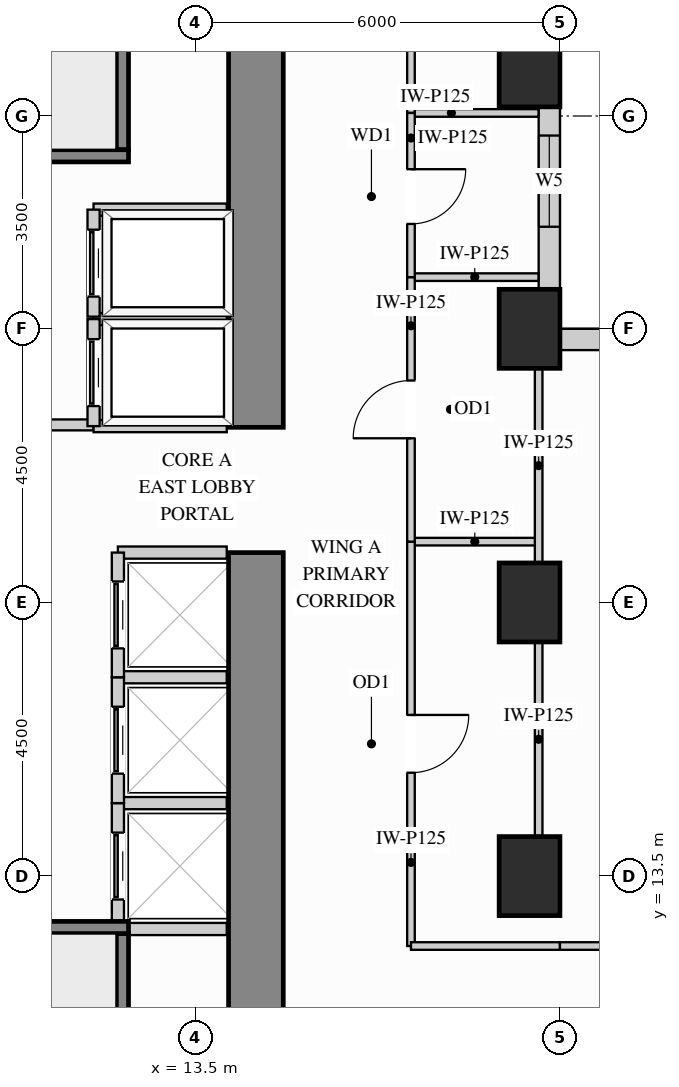
"""IFC4 building model, lengths in metres.
Left out: names, types, materials, properties, quantities, classifications, styles, units other than length and angle.
Written with IfcOpenShell. Run it as: python <this file> out.ifc"""

import sys

from ifc_helpers import new_model, si_unit, direction, frame, frame_2d, origin, origin_2d, place, context, subcontext, project, spatial, rectangle, extrude, source, transform, mapped, element, fill, save


model = new_model("IFC4")
c1 = context("Model", 3, precision=1e-05, world=origin(), true_north=direction((0.0, 1.0)))
c2 = subcontext(c1, "Body", "Model", "MODEL_VIEW")
j1 = project(units=[si_unit("LENGTHUNIT", "METRE"), si_unit("PLANEANGLEUNIT", "RADIAN")], contexts=[c1])
p1 = place(None, origin())
s1 = spatial("IfcSite", under=j1, at=p1, CompositionType="ELEMENT")
p2 = place(p1, origin())
s2 = spatial("IfcBuilding", under=s1, at=p2, CompositionType="ELEMENT")
p3 = place(p2, frame((0.0, 0.0, 54.9)))
s3 = spatial("IfcBuildingStorey", under=s2, at=p3, CompositionType="ELEMENT", Elevation=54.9)
m1 = source(origin(), c2, "Body", "SweptSolid", [
    extrude(rectangle(XDim=1.0, YDim=1.3, at=origin_2d()), origin(), (0.0, 0.0, 1.0), 3.38),
])
for number, where, z_axis, x_axis in (
    (1, (19.0, 13.5, 0.0), (0.0, 0.0, 1.0), (1.0, 0.0, 0.0)),
    (2, (19.0, 18.0, 0.0), (0.0, 0.0, 1.0), (1.0, 0.0, 0.0)),
    (3, (19.0, 22.5, 0.0), (0.0, 0.0, 1.0), (1.0, 0.0, 0.0)),
    (4, (19.0, 26.8, 0.0), (0.0, 0.0, 1.0), (1.0, 0.0, 0.0)),
):
    element("IfcColumn", number, at=place(p3, frame(where, z_axis=z_axis, x_axis=x_axis)), inside=s3, PredefinedType="COLUMN", context=c2, shape_type="MappedRepresentation", body=[
        mapped(m1, transform((0.0, 0.0, 0.0), x_axis=(1.0, 0.0, 0.0), y_axis=(0.0, 1.0, 0.0), z_axis=(0.0, 0.0, 1.0))),
    ])
m2 = source(origin(), c2, "Body", "SweptSolid", [
    extrude(rectangle(XDim=9.87, YDim=0.9, at=frame_2d((4.935, 0.0))), origin(), (0.0, 0.0, 1.0), 3.38),
])
p4 = place(p3, frame((14.5, 8.95, 0.0), z_axis=(0.0, 0.0, 1.0), x_axis=(0.0, 1.0, 0.0)))
e5 = element("IfcWall", 5, at=p4, inside=s3, PredefinedType="SHEAR", context=c2, shape_type="MappedRepresentation", body=[
    mapped(m2, transform((0.0, 0.0, 0.0), x_axis=(1.0, 0.0, 0.0), y_axis=(0.0, 1.0, 0.0), z_axis=(0.0, 0.0, 1.0))),
])
m3 = source(origin(), c2, "Body", "SweptSolid", [
    extrude(rectangle(XDim=8.17, YDim=0.9, at=frame_2d((4.085, 0.0))), origin(), (0.0, 0.0, 1.0), 3.38),
])
p5 = place(p3, frame((14.5, 20.88, 0.0), z_axis=(0.0, 0.0, 1.0), x_axis=(0.0, 1.0, 0.0)))
e6 = element("IfcWall", 6, at=p5, inside=s3, PredefinedType="SHEAR", context=c2, shape_type="MappedRepresentation", body=[
    mapped(m3, transform((0.0, 0.0, 0.0), x_axis=(1.0, 0.0, 0.0), y_axis=(0.0, 1.0, 0.0), z_axis=(0.0, 0.0, 1.0))),
])
p6 = place(p3, frame((34.352, 22.325, 0.0), z_axis=(0.0, 0.0, 1.0), x_axis=(-1.0, 0.0, 0.0)))
e7 = element("IfcWall", 7, at=p6, inside=s3, PredefinedType="SOLIDWALL", context=c2, shape_type="SweptSolid", body=[
    extrude(rectangle(XDim=14.854, YDim=0.35, at=frame_2d((7.427, 0.0))), origin(), (0.0, 0.0, 1.0), 3.365),
])
p7 = place(p6, frame((4.058, 0.0, 0.78)))
e8 = element("IfcOpeningElement", 8, at=p7, cuts=e7, PredefinedType="OPENING", context=c2, shape_type="SweptSolid", body=[
    extrude(rectangle(XDim=1.5, YDim=2.0, at=frame_2d((0.75, 1.0))), frame((0.0, 0.185, 0.0), z_axis=(0.0, -1.0, 0.0), x_axis=(1.0, 0.0, 0.0)), (0.0, 0.0, 1.0), 0.37),
])
p8 = place(p6, frame((9.296, 0.0, 0.78)))
e9 = element("IfcOpeningElement", 9, at=p8, cuts=e7, PredefinedType="OPENING", context=c2, shape_type="SweptSolid", body=[
    extrude(rectangle(XDim=1.5, YDim=2.0, at=frame_2d((0.75, 1.0))), frame((0.0, 0.185, 0.0), z_axis=(0.0, -1.0, 0.0), x_axis=(1.0, 0.0, 0.0)), (0.0, 0.0, 1.0), 0.37),
])
p9 = place(p3, frame((19.325, 23.148, 0.0), z_axis=(0.0, 0.0, 1.0), x_axis=(0.0, 1.0, 0.0)))
e10 = element("IfcWall", 10, at=p9, inside=s3, PredefinedType="SOLIDWALL", context=c2, shape_type="SweptSolid", body=[
    extrude(rectangle(XDim=3.004, YDim=0.35, at=frame_2d((1.502, 0.0))), origin(), (0.0, 0.0, 1.0), 2.51),
])
p10 = place(p9, frame((1.031, 0.0, 0.78)))
e11 = element("IfcOpeningElement", 11, at=p10, cuts=e10, PredefinedType="OPENING", context=c2, shape_type="SweptSolid", body=[
    extrude(rectangle(XDim=1.5, YDim=1.55, at=frame_2d((0.75, 0.775))), frame((0.0, 0.185, 0.0), z_axis=(0.0, -1.0, 0.0), x_axis=(1.0, 0.0, 0.0)), (0.0, 0.0, 1.0), 0.37),
])
p11 = place(p3, frame((7.15, 20.92, 0.0), z_axis=(0.0, 0.0, 1.0), x_axis=(1.0, 0.0, 0.0)))
e12 = element("IfcWall", 12, at=p11, inside=s3, PredefinedType="PARTITIONING", context=c2, shape_type="SweptSolid", body=[
    extrude(rectangle(XDim=4.68, YDim=0.18, at=frame_2d((2.34, 0.0))), origin(), (0.0, 0.0, 1.0), 3.365),
])
p12 = place(p11, frame((2.2, 0.0, 0.0)))
e13 = element("IfcOpeningElement", 13, at=p12, cuts=e12, PredefinedType="OPENING", context=c2, shape_type="SweptSolid", body=[
    extrude(rectangle(XDim=1.1, YDim=2.15, at=frame_2d((0.55, 1.075))), frame((0.0, 0.1, 0.0), z_axis=(0.0, -1.0, 0.0), x_axis=(1.0, 0.0, 0.0)), (0.0, 0.0, 1.0), 0.2),
])
m4 = source(origin(), c2, "Body", "SweptSolid", [
    extrude(rectangle(XDim=2.1, YDim=0.125, at=frame_2d((1.05, 0.0))), origin(), (0.0, 0.0, 1.0), 3.365),
])
p13 = place(p3, frame((17.05, 19.0, 0.0), z_axis=(0.0, 0.0, 1.0), x_axis=(1.0, 0.0, 0.0)))
e14 = element("IfcWall", 14, at=p13, inside=s3, PredefinedType="PARTITIONING", context=c2, shape_type="MappedRepresentation", body=[
    mapped(m4, transform((0.0, 0.0, 0.0), x_axis=(1.0, 0.0, 0.0), y_axis=(0.0, 1.0, 0.0), z_axis=(0.0, 0.0, 1.0))),
])
m5 = source(origin(), c2, "Body", "SweptSolid", [
    extrude(rectangle(XDim=2.098, YDim=0.125, at=frame_2d((1.049, 0.0))), origin(), (0.0, 0.0, 1.0), 3.365),
])
for number, where, z_axis, x_axis in (
    (15, (17.05, 23.35, 0.0), (0.0, 0.0, 1.0), (1.0, 0.0, 0.0)),
    (16, (17.05, 26.05, 0.0), (0.0, 0.0, 1.0), (1.0, 0.0, 0.0)),
):
    element("IfcWall", number, at=place(p3, frame(where, z_axis=z_axis, x_axis=x_axis)), inside=s3, PredefinedType="PARTITIONING", context=c2, shape_type="MappedRepresentation", body=[
        mapped(m5, transform((0.0, 0.0, 0.0), x_axis=(1.0, 0.0, 0.0), y_axis=(0.0, 1.0, 0.0), z_axis=(0.0, 0.0, 1.0))),
    ])
m6 = source(origin(), c2, "Body", "SweptSolid", [
    extrude(rectangle(XDim=3.18, YDim=0.125, at=frame_2d((1.59, 0.0))), origin(), (0.0, 0.0, 1.0), 2.67),
])
for number, where, z_axis, x_axis in (
    (17, (19.15, 14.16, 0.0), (0.0, 0.0, 1.0), (0.0, 1.0, 0.0)),
    (18, (19.15, 18.66, 0.0), (0.0, 0.0, 1.0), (0.0, 1.0, 0.0)),
):
    element("IfcWall", number, at=place(p3, frame(where, z_axis=z_axis, x_axis=x_axis)), inside=s3, PredefinedType="PARTITIONING", context=c2, shape_type="MappedRepresentation", body=[
        mapped(m6, transform((0.0, 0.0, 0.0), x_axis=(1.0, 0.0, 0.0), y_axis=(0.0, 1.0, 0.0), z_axis=(0.0, 0.0, 1.0))),
    ])
p14 = place(p3, frame((17.05, 12.35, 0.0), z_axis=(0.0, 0.0, 1.0), x_axis=(0.0, 1.0, 0.0)))
e19 = element("IfcWall", 19, at=p14, inside=s3, PredefinedType="PARTITIONING", context=c2, shape_type="SweptSolid", body=[
    extrude(rectangle(XDim=6.65, YDim=0.125, at=frame_2d((3.325, 0.0))), origin(), (0.0, 0.0, 1.0), 3.365),
])
p15 = place(p14, frame((2.85, 0.0, 0.0)))
e20 = element("IfcOpeningElement", 20, at=p15, cuts=e19, PredefinedType="OPENING", context=c2, shape_type="SweptSolid", body=[
    extrude(rectangle(XDim=0.95, YDim=2.15, at=frame_2d((0.475, 1.075))), frame((0.0, 0.073, 0.0), z_axis=(0.0, -1.0, 0.0), x_axis=(1.0, 0.0, 0.0)), (0.0, 0.0, 1.0), 0.145),
])
p16 = place(p3, frame((17.05, 19.0, 0.0), z_axis=(0.0, 0.0, 1.0), x_axis=(0.0, 1.0, 0.0)))
e21 = element("IfcWall", 21, at=p16, inside=s3, PredefinedType="PARTITIONING", context=c2, shape_type="SweptSolid", body=[
    extrude(rectangle(XDim=4.35, YDim=0.125, at=frame_2d((2.175, 0.0))), origin(), (0.0, 0.0, 1.0), 3.365),
])
p17 = place(p16, frame((1.7, 0.0, 0.0)))
e22 = element("IfcOpeningElement", 22, at=p17, cuts=e21, PredefinedType="OPENING", context=c2, shape_type="SweptSolid", body=[
    extrude(rectangle(XDim=0.95, YDim=2.15, at=frame_2d((0.475, 1.075))), frame((0.0, 0.073, 0.0), z_axis=(0.0, -1.0, 0.0), x_axis=(1.0, 0.0, 0.0)), (0.0, 0.0, 1.0), 0.145),
])
p18 = place(p3, frame((17.05, 26.05, 0.0), z_axis=(0.0, 0.0, 1.0), x_axis=(0.0, 1.0, 0.0)))
e23 = element("IfcWall", 23, at=p18, inside=s3, PredefinedType="PARTITIONING", context=c2, shape_type="SweptSolid", body=[
    extrude(rectangle(XDim=7.2, YDim=0.125, at=frame_2d((3.6, 0.0))), origin(), (0.0, 0.0, 1.0), 3.365),
])
p19 = place(p18, frame((3.125, 0.0, 0.0)))
e24 = element("IfcOpeningElement", 24, at=p19, cuts=e23, PredefinedType="OPENING", context=c2, shape_type="SweptSolid", body=[
    extrude(rectangle(XDim=0.95, YDim=2.15, at=frame_2d((0.475, 1.075))), frame((0.0, 0.073, 0.0), z_axis=(0.0, -1.0, 0.0), x_axis=(1.0, 0.0, 0.0)), (0.0, 0.0, 1.0), 0.145),
])
p20 = place(p3, frame((17.05, 23.35, 0.0), z_axis=(0.0, 0.0, 1.0), x_axis=(0.0, 1.0, 0.0)))
e25 = element("IfcWall", 25, at=p20, inside=s3, PredefinedType="PARTITIONING", context=c2, shape_type="SweptSolid", body=[
    extrude(rectangle(XDim=2.7, YDim=0.125, at=frame_2d((1.35, 0.0))), origin(), (0.0, 0.0, 1.0), 3.365),
])
p21 = place(p20, frame((0.875, 0.0, 0.0)))
e26 = element("IfcOpeningElement", 26, at=p21, cuts=e25, PredefinedType="OPENING", context=c2, shape_type="SweptSolid", body=[
    extrude(rectangle(XDim=0.9, YDim=2.15, at=frame_2d((0.45, 1.075))), frame((0.0, 0.073, 0.0), z_axis=(0.0, -1.0, 0.0), x_axis=(1.0, 0.0, 0.0)), (0.0, 0.0, 1.0), 0.145),
])
m7 = source(origin(), c2, "Body", "SweptSolid", [
    extrude(rectangle(XDim=2.45, YDim=0.125, at=frame_2d((1.225, 0.0))), origin(), (0.0, 0.0, 1.0), 3.365),
])
p22 = place(p3, frame((17.05, 12.35, 0.0), z_axis=(0.0, 0.0, 1.0), x_axis=(1.0, 0.0, 0.0)))
e27 = element("IfcWall", 27, at=p22, inside=s3, PredefinedType="PARTITIONING", context=c2, shape_type="MappedRepresentation", body=[
    mapped(m7, transform((0.0, 0.0, 0.0), x_axis=(1.0, 0.0, 0.0), y_axis=(0.0, 1.0, 0.0), z_axis=(0.0, 0.0, 1.0))),
])
p23 = place(p3, frame((19.5, 12.35, 0.0), z_axis=(0.0, 0.0, 1.0), x_axis=(1.0, 0.0, 0.0)))
e28 = element("IfcWall", 28, at=p23, inside=s3, PredefinedType="PARTITIONING", context=c2, shape_type="SweptSolid", body=[
    extrude(rectangle(XDim=4.55, YDim=0.125, at=frame_2d((2.275, 0.0))), origin(), (0.0, 0.0, 1.0), 3.365),
])
p24 = place(p23, frame((1.8, 0.0, 0.0)))
e29 = element("IfcOpeningElement", 29, at=p24, cuts=e28, PredefinedType="OPENING", context=c2, shape_type="SweptSolid", body=[
    extrude(rectangle(XDim=0.95, YDim=2.15, at=frame_2d((0.475, 1.075))), frame((0.0, 0.073, 0.0), z_axis=(0.0, -1.0, 0.0), x_axis=(1.0, 0.0, 0.0)), (0.0, 0.0, 1.0), 0.145),
])
m8 = source(origin(), c2, "Body", "SweptSolid", [
    extrude(rectangle(XDim=2.19, YDim=0.2, at=frame_2d((1.095, 0.0))), origin(), (0.0, 0.0, 1.0), 3.365),
])
for number, where, z_axis, x_axis in (
    (30, (11.83, 22.66, 0.0), (0.0, 0.0, 1.0), (1.0, 0.0, 0.0)),
    (31, (11.83, 20.9, 0.0), (0.0, 0.0, 1.0), (1.0, 0.0, 0.0)),
):
    element("IfcWall", number, at=place(p3, frame(where, z_axis=z_axis, x_axis=x_axis)), inside=s3, PredefinedType="PARTITIONING", context=c2, shape_type="MappedRepresentation", body=[
        mapped(m8, transform((0.0, 0.0, 0.0), x_axis=(1.0, 0.0, 0.0), y_axis=(0.0, 1.0, 0.0), z_axis=(0.0, 0.0, 1.0))),
    ])
p25 = place(p3, frame((11.83, 20.9, 0.0), z_axis=(0.0, 0.0, 1.0), x_axis=(0.0, 1.0, 0.0)))
e32 = element("IfcWall", 32, at=p25, inside=s3, PredefinedType="PARTITIONING", context=c2, shape_type="SweptSolid", body=[
    extrude(rectangle(XDim=1.76, YDim=0.2, at=frame_2d((0.88, 0.0))), origin(), (0.0, 0.0, 1.0), 3.365),
])
p26 = place(p25, frame((0.33, 0.0, 0.0)))
e33 = element("IfcOpeningElement", 33, at=p26, cuts=e32, PredefinedType="OPENING", context=c2, shape_type="SweptSolid", body=[
    extrude(rectangle(XDim=1.1, YDim=2.2, at=frame_2d((0.55, 1.1))), frame((0.0, 0.11, 0.0), z_axis=(0.0, -1.0, 0.0), x_axis=(1.0, 0.0, 0.0)), (0.0, 0.0, 1.0), 0.22),
])
p27 = place(p3, frame((11.83, 24.46, 0.0), z_axis=(0.0, 0.0, 1.0), x_axis=(1.0, 0.0, 0.0)))
e34 = element("IfcWall", 34, at=p27, inside=s3, PredefinedType="PARTITIONING", context=c2, shape_type="MappedRepresentation", body=[
    mapped(m8, transform((0.0, 0.0, 0.0), x_axis=(1.0, 0.0, 0.0), y_axis=(0.0, 1.0, 0.0), z_axis=(0.0, 0.0, 1.0))),
])
p28 = place(p3, frame((11.83, 22.7, 0.0), z_axis=(0.0, 0.0, 1.0), x_axis=(0.0, 1.0, 0.0)))
e35 = element("IfcWall", 35, at=p28, inside=s3, PredefinedType="PARTITIONING", context=c2, shape_type="SweptSolid", body=[
    extrude(rectangle(XDim=1.76, YDim=0.2, at=frame_2d((0.88, 0.0))), origin(), (0.0, 0.0, 1.0), 3.365),
])
p29 = place(p28, frame((0.33, 0.0, 0.0)))
e36 = element("IfcOpeningElement", 36, at=p29, cuts=e35, PredefinedType="OPENING", context=c2, shape_type="SweptSolid", body=[
    extrude(rectangle(XDim=1.1, YDim=2.2, at=frame_2d((0.55, 1.1))), frame((0.0, 0.11, 0.0), z_axis=(0.0, -1.0, 0.0), x_axis=(1.0, 0.0, 0.0)), (0.0, 0.0, 1.0), 0.22),
])
m9 = source(origin(), c2, "Body", "SweptSolid", [
    extrude(rectangle(XDim=1.79, YDim=0.2, at=frame_2d((0.895, 0.0))), origin(), (0.0, 0.0, 1.0), 3.365),
])
for number, where, z_axis, x_axis in (
    (37, (12.23, 14.7, 0.0), (0.0, 0.0, 1.0), (1.0, 0.0, 0.0)),
    (38, (12.23, 12.63, 0.0), (0.0, 0.0, 1.0), (1.0, 0.0, 0.0)),
):
    element("IfcWall", number, at=place(p3, frame(where, z_axis=z_axis, x_axis=x_axis)), inside=s3, PredefinedType="PARTITIONING", context=c2, shape_type="MappedRepresentation", body=[
        mapped(m9, transform((0.0, 0.0, 0.0), x_axis=(1.0, 0.0, 0.0), y_axis=(0.0, 1.0, 0.0), z_axis=(0.0, 0.0, 1.0))),
    ])
p30 = place(p3, frame((12.23, 12.63, 0.0), z_axis=(0.0, 0.0, 1.0), x_axis=(0.0, 1.0, 0.0)))
e39 = element("IfcWall", 39, at=p30, inside=s3, PredefinedType="PARTITIONING", context=c2, shape_type="SweptSolid", body=[
    extrude(rectangle(XDim=2.07, YDim=0.2, at=frame_2d((1.035, 0.0))), origin(), (0.0, 0.0, 1.0), 3.365),
])
p31 = place(p30, frame((0.485, 0.0, 0.0)))
e40 = element("IfcOpeningElement", 40, at=p31, cuts=e39, PredefinedType="OPENING", context=c2, shape_type="SweptSolid", body=[
    extrude(rectangle(XDim=1.1, YDim=2.2, at=frame_2d((0.55, 1.1))), frame((0.0, 0.11, 0.0), z_axis=(0.0, -1.0, 0.0), x_axis=(1.0, 0.0, 0.0)), (0.0, 0.0, 1.0), 0.22),
])
p32 = place(p3, frame((12.23, 16.77, 0.0), z_axis=(0.0, 0.0, 1.0), x_axis=(1.0, 0.0, 0.0)))
e41 = element("IfcWall", 41, at=p32, inside=s3, PredefinedType="PARTITIONING", context=c2, shape_type="MappedRepresentation", body=[
    mapped(m9, transform((0.0, 0.0, 0.0), x_axis=(1.0, 0.0, 0.0), y_axis=(0.0, 1.0, 0.0), z_axis=(0.0, 0.0, 1.0))),
])
p33 = place(p3, frame((12.23, 14.7, 0.0), z_axis=(0.0, 0.0, 1.0), x_axis=(0.0, 1.0, 0.0)))
e42 = element("IfcWall", 42, at=p33, inside=s3, PredefinedType="PARTITIONING", context=c2, shape_type="SweptSolid", body=[
    extrude(rectangle(XDim=2.07, YDim=0.2, at=frame_2d((1.035, 0.0))), origin(), (0.0, 0.0, 1.0), 3.365),
])
p34 = place(p33, frame((0.485, 0.0, 0.0)))
e43 = element("IfcOpeningElement", 43, at=p34, cuts=e42, PredefinedType="OPENING", context=c2, shape_type="SweptSolid", body=[
    extrude(rectangle(XDim=1.1, YDim=2.2, at=frame_2d((0.55, 1.1))), frame((0.0, 0.11, 0.0), z_axis=(0.0, -1.0, 0.0), x_axis=(1.0, 0.0, 0.0)), (0.0, 0.0, 1.0), 0.22),
])
p35 = place(p3, frame((12.23, 18.82, 0.0), z_axis=(0.0, 0.0, 1.0), x_axis=(1.0, 0.0, 0.0)))
e44 = element("IfcWall", 44, at=p35, inside=s3, PredefinedType="PARTITIONING", context=c2, shape_type="MappedRepresentation", body=[
    mapped(m9, transform((0.0, 0.0, 0.0), x_axis=(1.0, 0.0, 0.0), y_axis=(0.0, 1.0, 0.0), z_axis=(0.0, 0.0, 1.0))),
])
p36 = place(p3, frame((12.23, 16.77, 0.0), z_axis=(0.0, 0.0, 1.0), x_axis=(0.0, 1.0, 0.0)))
e45 = element("IfcWall", 45, at=p36, inside=s3, PredefinedType="PARTITIONING", context=c2, shape_type="SweptSolid", body=[
    extrude(rectangle(XDim=2.05, YDim=0.2, at=frame_2d((1.025, 0.0))), origin(), (0.0, 0.0, 1.0), 3.365),
])
p37 = place(p36, frame((0.475, 0.0, 0.0)))
e46 = element("IfcOpeningElement", 46, at=p37, cuts=e45, PredefinedType="OPENING", context=c2, shape_type="SweptSolid", body=[
    extrude(rectangle(XDim=1.1, YDim=2.2, at=frame_2d((0.55, 1.1))), frame((0.0, 0.11, 0.0), z_axis=(0.0, -1.0, 0.0), x_axis=(1.0, 0.0, 0.0)), (0.0, 0.0, 1.0), 0.22),
])
m10 = source(origin(), c2, "Body", "SweptSolid", [
    extrude(rectangle(XDim=3.603, YDim=0.2, at=frame_2d((1.802, 0.0))), origin(), (0.0, 0.0, 1.0), 3.38),
])
p38 = place(p3, frame((12.305, 8.952, 0.0), z_axis=(0.0, 0.0, 1.0), x_axis=(0.0, 1.0, 0.0)))
e47 = element("IfcWall", 47, at=p38, inside=s3, PredefinedType="SHEAR", context=c2, shape_type="MappedRepresentation", body=[
    mapped(m10, transform((0.0, 0.0, 0.0), x_axis=(1.0, 0.0, 0.0), y_axis=(0.0, 1.0, 0.0), z_axis=(0.0, 0.0, 1.0))),
])
p39 = place(p3, frame((4.952, 12.655, 0.0), z_axis=(0.0, 0.0, 1.0), x_axis=(1.0, 0.0, 0.0)))
e48 = element("IfcWall", 48, at=p39, inside=s3, PredefinedType="SHEAR", context=c2, shape_type="SweptSolid", body=[
    extrude(rectangle(XDim=7.453, YDim=0.2, at=frame_2d((3.727, 0.0))), origin(), (0.0, 0.0, 1.0), 3.38),
])
p40 = place(p39, frame((0.4, 0.0, 0.0)))
e49 = element("IfcOpeningElement", 49, at=p40, cuts=e48, PredefinedType="OPENING", context=c2, shape_type="SweptSolid", body=[
    extrude(rectangle(XDim=1.1, YDim=2.15, at=frame_2d((0.55, 1.075))), frame((0.0, 0.11, 0.0), z_axis=(0.0, -1.0, 0.0), x_axis=(1.0, 0.0, 0.0)), (0.0, 0.0, 1.0), 0.22),
])
p41 = place(p3, frame((12.305, 25.445, 0.0), z_axis=(0.0, 0.0, 1.0), x_axis=(0.0, 1.0, 0.0)))
e50 = element("IfcWall", 50, at=p41, inside=s3, PredefinedType="SHEAR", context=c2, shape_type="MappedRepresentation", body=[
    mapped(m10, transform((0.0, 0.0, 0.0), x_axis=(1.0, 0.0, 0.0), y_axis=(0.0, 1.0, 0.0), z_axis=(0.0, 0.0, 1.0))),
])
p42 = place(p3, frame((4.952, 25.345, 0.0), z_axis=(0.0, 0.0, 1.0), x_axis=(1.0, 0.0, 0.0)))
e51 = element("IfcWall", 51, at=p42, inside=s3, PredefinedType="SHEAR", context=c2, shape_type="SweptSolid", body=[
    extrude(rectangle(XDim=7.453, YDim=0.2, at=frame_2d((3.727, 0.0))), origin(), (0.0, 0.0, 1.0), 3.38),
])
p43 = place(p42, frame((0.4, 0.0, 0.0)))
e52 = element("IfcOpeningElement", 52, at=p43, cuts=e51, PredefinedType="OPENING", context=c2, shape_type="SweptSolid", body=[
    extrude(rectangle(XDim=1.1, YDim=2.15, at=frame_2d((0.55, 1.075))), frame((0.0, 0.11, 0.0), z_axis=(0.0, -1.0, 0.0), x_axis=(1.0, 0.0, 0.0)), (0.0, 0.0, 1.0), 0.22),
])
m11 = source(origin(), c2, "Body", "SweptSolid", [
    extrude(rectangle(XDim=1.1, YDim=2.2, at=frame_2d((0.55, 1.1))), frame((0.0, 0.025, 0.0), z_axis=(0.0, -1.0, 0.0), x_axis=(1.0, 0.0, 0.0)), (0.0, 0.0, 1.0), 0.05),
])
p44 = place(p26, origin())
e53 = element("IfcDoor", 53, at=p44, inside=s3, OperationType="SLIDING_TO_LEFT", PredefinedType="DOOR", context=c2, shape_type="MappedRepresentation", body=[
    mapped(m11, transform((0.0, 0.0, 0.0), x_axis=(1.0, 0.0, 0.0), y_axis=(0.0, 1.0, 0.0), z_axis=(0.0, 0.0, 1.0))),
])
fill(e33, e53)
p45 = place(p29, origin())
e54 = element("IfcDoor", 54, at=p45, inside=s3, OperationType="SLIDING_TO_LEFT", PredefinedType="DOOR", context=c2, shape_type="MappedRepresentation", body=[
    mapped(m11, transform((0.0, 0.0, 0.0), x_axis=(1.0, 0.0, 0.0), y_axis=(0.0, 1.0, 0.0), z_axis=(0.0, 0.0, 1.0))),
])
fill(e36, e54)
p46 = place(p31, origin())
e55 = element("IfcDoor", 55, at=p46, inside=s3, OperationType="SLIDING_TO_LEFT", PredefinedType="DOOR", context=c2, shape_type="MappedRepresentation", body=[
    mapped(m11, transform((0.0, 0.0, 0.0), x_axis=(1.0, 0.0, 0.0), y_axis=(0.0, 1.0, 0.0), z_axis=(0.0, 0.0, 1.0))),
])
fill(e40, e55)
p47 = place(p34, origin())
e56 = element("IfcDoor", 56, at=p47, inside=s3, OperationType="SLIDING_TO_LEFT", PredefinedType="DOOR", context=c2, shape_type="MappedRepresentation", body=[
    mapped(m11, transform((0.0, 0.0, 0.0), x_axis=(1.0, 0.0, 0.0), y_axis=(0.0, 1.0, 0.0), z_axis=(0.0, 0.0, 1.0))),
])
fill(e43, e56)
p48 = place(p37, origin())
e57 = element("IfcDoor", 57, at=p48, inside=s3, OperationType="SLIDING_TO_LEFT", PredefinedType="DOOR", context=c2, shape_type="MappedRepresentation", body=[
    mapped(m11, transform((0.0, 0.0, 0.0), x_axis=(1.0, 0.0, 0.0), y_axis=(0.0, 1.0, 0.0), z_axis=(0.0, 0.0, 1.0))),
])
fill(e46, e57)
m12 = source(origin(), c2, "Body", "SweptSolid", [
    extrude(rectangle(XDim=0.95, YDim=2.15, at=frame_2d((0.475, 1.075))), frame((0.0, 0.025, 0.0), z_axis=(0.0, -1.0, 0.0), x_axis=(1.0, 0.0, 0.0)), (0.0, 0.0, 1.0), 0.05),
])
p49 = place(p15, origin())
e58 = element("IfcDoor", 58, at=p49, inside=s3, OperationType="SINGLE_SWING_RIGHT", PredefinedType="DOOR", context=c2, shape_type="MappedRepresentation", body=[
    mapped(m12, transform((0.0, 0.0, 0.0), x_axis=(1.0, 0.0, 0.0), y_axis=(0.0, 1.0, 0.0), z_axis=(0.0, 0.0, 1.0))),
])
fill(e20, e58)
p50 = place(p17, origin())
e59 = element("IfcDoor", 59, at=p50, inside=s3, OperationType="SINGLE_SWING_LEFT", PredefinedType="DOOR", context=c2, shape_type="MappedRepresentation", body=[
    mapped(m12, transform((0.0, 0.0, 0.0), x_axis=(1.0, 0.0, 0.0), y_axis=(0.0, 1.0, 0.0), z_axis=(0.0, 0.0, 1.0))),
])
fill(e22, e59)
m13 = source(origin(), c2, "Body", "SweptSolid", [
    extrude(rectangle(XDim=0.9, YDim=2.15, at=frame_2d((0.45, 1.075))), frame((0.0, 0.025, 0.0), z_axis=(0.0, -1.0, 0.0), x_axis=(1.0, 0.0, 0.0)), (0.0, 0.0, 1.0), 0.05),
])
p51 = place(p21, origin())
e60 = element("IfcDoor", 60, at=p51, inside=s3, OperationType="SINGLE_SWING_RIGHT", PredefinedType="DOOR", context=c2, shape_type="MappedRepresentation", body=[
    mapped(m13, transform((0.0, 0.0, 0.0), x_axis=(1.0, 0.0, 0.0), y_axis=(0.0, 1.0, 0.0), z_axis=(0.0, 0.0, 1.0))),
])
fill(e26, e60)
m14 = source(origin(), c2, "Body", "SweptSolid", [
    extrude(rectangle(XDim=1.5, YDim=1.55, at=frame_2d((0.75, 0.775))), frame((0.0, 0.03, 0.0), z_axis=(0.0, -1.0, 0.0), x_axis=(1.0, 0.0, 0.0)), (0.0, 0.0, 1.0), 0.06),
])
p52 = place(p10, origin())
e61 = element("IfcWindow", 61, at=p52, inside=s3, PartitioningType="SINGLE_PANEL", PredefinedType="WINDOW", context=c2, shape_type="MappedRepresentation", body=[
    mapped(m14, transform((0.0, 0.0, 0.0), x_axis=(1.0, 0.0, 0.0), y_axis=(0.0, 1.0, 0.0), z_axis=(0.0, 0.0, 1.0))),
])
fill(e11, e61)
save(model, sys.argv[1])
